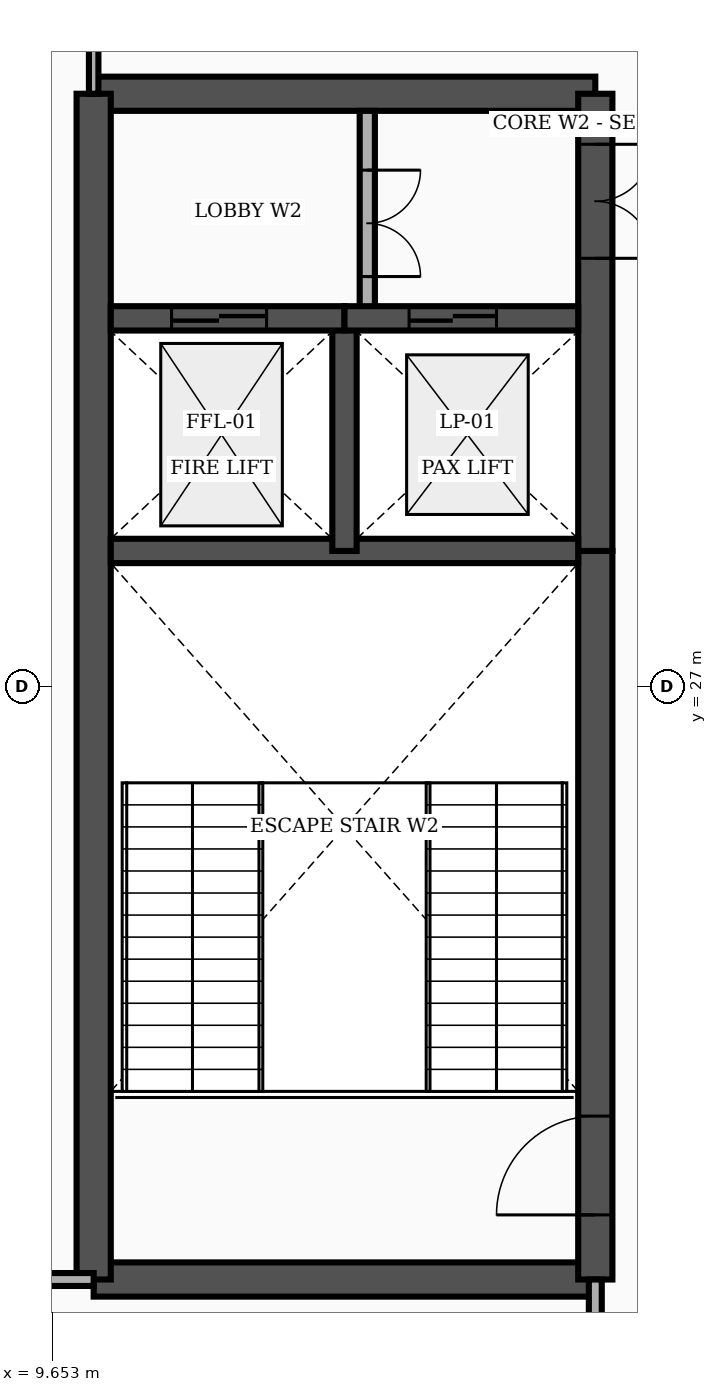
"""IFC4 building model, lengths in metres.
Left out: names, types, materials, properties, quantities, classifications, styles, units other than length and angle.
Written with IfcOpenShell. Run it as: python <this file> out.ifc"""

import sys

from ifc_helpers import new_model, si_unit, direction, frame, frame_2d, origin, place, context, subcontext, project, spatial, rectangle, extrude, element, fill, save


model = new_model("IFC4")
c1 = context("Model", 3, precision=1e-05, world=origin(), true_north=direction((0.0, 1.0)))
c2 = subcontext(c1, "Body", "Model", "MODEL_VIEW")
j1 = project(units=[si_unit("LENGTHUNIT", "METRE"), si_unit("PLANEANGLEUNIT", "RADIAN")], contexts=[c1])
p1 = place(None, origin())
s1 = spatial("IfcSite", under=j1, at=p1, CompositionType="ELEMENT")
p2 = place(p1, origin())
s2 = spatial("IfcBuilding", under=s1, at=p2, CompositionType="ELEMENT")
p3 = place(p2, frame((0.0, 0.0, 16.8)))
s3 = spatial("IfcBuildingStorey", under=s2, at=p3, CompositionType="ELEMENT", Elevation=16.8)
for number, where, z_axis, x_axis in (
    (1, (10.2, 19.2, 0.0), (0.0, 0.0, 1.0), (1.0, 0.0, 0.0)),
    (2, (10.2, 34.8, 0.0), (0.0, 0.0, 1.0), (1.0, 0.0, 0.0)),
):
    element("IfcWall", number, at=place(p3, frame(where, z_axis=z_axis, x_axis=x_axis)), inside=s3, PredefinedType="SHEAR", context=c2, shape_type="SweptSolid", body=[
        extrude(rectangle(XDim=6.6, YDim=0.45, at=frame_2d((3.3, 0.0))), origin(), (0.0, 0.0, 1.0), 4.555),
    ])
p4 = place(p3, frame((10.2, 19.2, 0.0), z_axis=(0.0, 0.0, 1.0), x_axis=(0.0, 1.0, 0.0)))
e3 = element("IfcWall", 3, at=p4, inside=s3, PredefinedType="SHEAR", context=c2, shape_type="SweptSolid", body=[
    extrude(rectangle(XDim=15.6, YDim=0.45, at=frame_2d((7.8, 0.0))), origin(), (0.0, 0.0, 1.0), 4.555),
])
p5 = place(p3, frame((16.8, 19.2, 0.0), z_axis=(0.0, 0.0, 1.0), x_axis=(0.0, 1.0, 0.0)))
e4 = element("IfcWall", 4, at=p5, inside=s3, PredefinedType="SHEAR", context=c2, shape_type="SweptSolid", body=[
    extrude(rectangle(XDim=9.585, YDim=0.45, at=frame_2d((4.792, 0.0))), origin(), (0.0, 0.0, 1.0), 4.555),
])
p6 = place(p5, frame((0.85, 0.0, 0.0)))
e5 = element("IfcOpeningElement", 5, at=p6, cuts=e4, PredefinedType="OPENING", context=c2, shape_type="SweptSolid", body=[
    extrude(rectangle(XDim=1.3, YDim=2.2, at=frame_2d((0.65, 1.1))), frame((0.0, 0.237, 0.0), z_axis=(0.0, -1.0, 0.0), x_axis=(1.0, 0.0, 0.0)), (0.0, 0.0, 1.0), 0.474),
])
p7 = place(p3, frame((16.8, 28.785, 0.0), z_axis=(0.0, 0.0, 1.0), x_axis=(0.0, 1.0, 0.0)))
e6 = element("IfcWall", 6, at=p7, inside=s3, PredefinedType="SHEAR", context=c2, shape_type="SweptSolid", body=[
    extrude(rectangle(XDim=6.015, YDim=0.45, at=frame_2d((3.008, 0.0))), origin(), (0.0, 0.0, 1.0), 4.555),
])
p8 = place(p7, frame((3.85, 0.0, 0.0)))
e7 = element("IfcOpeningElement", 7, at=p8, cuts=e6, PredefinedType="OPENING", context=c2, shape_type="SweptSolid", body=[
    extrude(rectangle(XDim=1.5, YDim=2.2, at=frame_2d((0.75, 1.1))), frame((0.0, 0.237, 0.0), z_axis=(0.0, -1.0, 0.0), x_axis=(1.0, 0.0, 0.0)), (0.0, 0.0, 1.0), 0.474),
])
p9 = place(p3, frame((10.425, 28.785, 0.0), z_axis=(0.0, 0.0, 1.0), x_axis=(1.0, 0.0, 0.0)))
e8 = element("IfcWall", 8, at=p9, inside=s3, PredefinedType="SHEAR", context=c2, shape_type="SweptSolid", body=[
    extrude(rectangle(XDim=6.15, YDim=0.32, at=frame_2d((3.075, 0.0))), origin(), (0.0, 0.0, 1.0), 4.555),
])
p10 = place(p3, frame((13.5, 28.785, 0.0), z_axis=(0.0, 0.0, 1.0), x_axis=(0.0, 1.0, 0.0)))
e9 = element("IfcWall", 9, at=p10, inside=s3, PredefinedType="SHEAR", context=c2, shape_type="SweptSolid", body=[
    extrude(rectangle(XDim=3.06, YDim=0.32, at=frame_2d((1.53, 0.0))), origin(), (0.0, 0.0, 1.0), 4.555),
])
p11 = place(p3, frame((13.8, 31.845, 0.0), z_axis=(0.0, 0.0, 1.0), x_axis=(0.0, 1.0, 0.0)))
e10 = element("IfcWall", 10, at=p11, inside=s3, PredefinedType="PARTITIONING", context=c2, shape_type="SweptSolid", body=[
    extrude(rectangle(XDim=2.73, YDim=0.2, at=frame_2d((1.365, 0.0))), origin(), (0.0, 0.0, 1.0), 4.555),
])
p12 = place(p11, frame((0.55, 0.0, 0.0)))
e11 = element("IfcOpeningElement", 11, at=p12, cuts=e10, PredefinedType="OPENING", context=c2, shape_type="SweptSolid", body=[
    extrude(rectangle(XDim=1.4, YDim=2.25, at=frame_2d((0.7, 1.125))), frame((0.0, 0.112, 0.0), z_axis=(0.0, -1.0, 0.0), x_axis=(1.0, 0.0, 0.0)), (0.0, 0.0, 1.0), 0.224),
])
p13 = place(p3, frame((10.425, 31.845, 0.0), z_axis=(0.0, 0.0, 1.0), x_axis=(1.0, 0.0, 0.0)))
e12 = element("IfcWall", 12, at=p13, inside=s3, PredefinedType="SHEAR", context=c2, shape_type="SweptSolid", body=[
    extrude(rectangle(XDim=3.075, YDim=0.32, at=frame_2d((1.538, 0.0))), origin(), (0.0, 0.0, 1.0), 4.555),
])
p14 = place(p13, frame((0.8, 0.0, 0.0)))
e13 = element("IfcOpeningElement", 13, at=p14, cuts=e12, PredefinedType="OPENING", context=c2, shape_type="SweptSolid", body=[
    extrude(rectangle(XDim=1.25, YDim=2.25, at=frame_2d((0.625, 1.125))), frame((0.0, 0.172, 0.0), z_axis=(0.0, -1.0, 0.0), x_axis=(1.0, 0.0, 0.0)), (0.0, 0.0, 1.0), 0.344),
])
p15 = place(p3, frame((13.5, 31.845, 0.0), z_axis=(0.0, 0.0, 1.0), x_axis=(1.0, 0.0, 0.0)))
e14 = element("IfcWall", 14, at=p15, inside=s3, PredefinedType="SHEAR", context=c2, shape_type="SweptSolid", body=[
    extrude(rectangle(XDim=3.075, YDim=0.32, at=frame_2d((1.538, 0.0))), origin(), (0.0, 0.0, 1.0), 4.555),
])
p16 = place(p15, frame((0.85, 0.0, 0.0)))
e15 = element("IfcOpeningElement", 15, at=p16, cuts=e14, PredefinedType="OPENING", context=c2, shape_type="SweptSolid", body=[
    extrude(rectangle(XDim=1.15, YDim=2.2, at=frame_2d((0.575, 1.1))), frame((0.0, 0.172, 0.0), z_axis=(0.0, -1.0, 0.0), x_axis=(1.0, 0.0, 0.0)), (0.0, 0.0, 1.0), 0.344),
])
p17 = place(p3, frame((10.2, 34.8, 0.0), z_axis=(0.0, 0.0, 1.0), x_axis=(0.0, 1.0, 0.0)))
e16 = element("IfcWall", 16, at=p17, inside=s3, PredefinedType="PARTITIONING", context=c2, shape_type="SweptSolid", body=[
    extrude(rectangle(XDim=2.0, YDim=0.125, at=frame_2d((1.0, 0.0))), origin(), (0.0, 0.0, 1.0), 4.555),
])
p18 = place(p3, frame((0.17, 19.2, 0.0), z_axis=(0.0, 0.0, 1.0), x_axis=(1.0, 0.0, 0.0)))
e17 = element("IfcWall", 17, at=p18, inside=s3, PredefinedType="PARTITIONING", context=c2, shape_type="SweptSolid", body=[
    extrude(rectangle(XDim=10.03, YDim=0.17, at=frame_2d((5.015, 0.0))), origin(), (0.0, 0.0, 1.0), 4.555),
])
p19 = place(p3, frame((16.8, 0.17, 0.0), z_axis=(0.0, 0.0, 1.0), x_axis=(0.0, 1.0, 0.0)))
e18 = element("IfcWall", 18, at=p19, inside=s3, PredefinedType="PARTITIONING", context=c2, shape_type="SweptSolid", body=[
    extrude(rectangle(XDim=19.03, YDim=0.17, at=frame_2d((9.515, 0.0))), origin(), (0.0, 0.0, 1.0), 4.555),
])
p20 = place(p19, frame((3.3, 0.0, 0.0)))
e19 = element("IfcOpeningElement", 19, at=p20, cuts=e18, PredefinedType="OPENING", context=c2, shape_type="SweptSolid", body=[
    extrude(rectangle(XDim=1.15, YDim=2.15, at=frame_2d((0.575, 1.075))), frame((0.0, 0.097, 0.0), z_axis=(0.0, -1.0, 0.0), x_axis=(1.0, 0.0, 0.0)), (0.0, 0.0, 1.0), 0.194),
])
p21 = place(p6, origin())
e20 = element("IfcDoor", 20, at=p21, inside=s3, OperationType="SINGLE_SWING_LEFT", PredefinedType="DOOR", context=c2, shape_type="SweptSolid", body=[
    extrude(rectangle(XDim=1.3, YDim=2.2, at=frame_2d((0.65, 1.1))), frame((0.0, 0.025, 0.0), z_axis=(0.0, -1.0, 0.0), x_axis=(1.0, 0.0, 0.0)), (0.0, 0.0, 1.0), 0.05),
])
fill(e5, e20)
p22 = place(p8, frame((1.5, 0.0, 0.0), z_axis=(0.0, 0.0, 1.0), x_axis=(-1.0, 0.0, 0.0)))
e21 = element("IfcDoor", 21, at=p22, inside=s3, OperationType="DOUBLE_DOOR_SINGLE_SWING", PredefinedType="DOOR", context=c2, shape_type="SweptSolid", body=[
    extrude(rectangle(XDim=1.5, YDim=2.2, at=frame_2d((0.75, 1.1))), frame((0.0, 0.025, 0.0), z_axis=(0.0, -1.0, 0.0), x_axis=(1.0, 0.0, 0.0)), (0.0, 0.0, 1.0), 0.05),
])
fill(e7, e21)
p23 = place(p12, frame((1.4, 0.0, 0.0), z_axis=(0.0, 0.0, 1.0), x_axis=(-1.0, 0.0, 0.0)))
e22 = element("IfcDoor", 22, at=p23, inside=s3, OperationType="DOUBLE_DOOR_SINGLE_SWING", PredefinedType="DOOR", context=c2, shape_type="SweptSolid", body=[
    extrude(rectangle(XDim=1.4, YDim=2.25, at=frame_2d((0.7, 1.125))), frame((0.0, 0.025, 0.0), z_axis=(0.0, -1.0, 0.0), x_axis=(1.0, 0.0, 0.0)), (0.0, 0.0, 1.0), 0.05),
])
fill(e11, e22)
p24 = place(p14, origin())
e23 = element("IfcDoor", 23, at=p24, inside=s3, OperationType="DOUBLE_DOOR_SLIDING", PredefinedType="DOOR", context=c2, shape_type="SweptSolid", body=[
    extrude(rectangle(XDim=1.25, YDim=2.25, at=frame_2d((0.625, 1.125))), frame((0.0, 0.025, 0.0), z_axis=(0.0, -1.0, 0.0), x_axis=(1.0, 0.0, 0.0)), (0.0, 0.0, 1.0), 0.05),
])
fill(e13, e23)
p25 = place(p16, origin())
e24 = element("IfcDoor", 24, at=p25, inside=s3, OperationType="DOUBLE_DOOR_SLIDING", PredefinedType="DOOR", context=c2, shape_type="SweptSolid", body=[
    extrude(rectangle(XDim=1.15, YDim=2.2, at=frame_2d((0.575, 1.1))), frame((0.0, 0.025, 0.0), z_axis=(0.0, -1.0, 0.0), x_axis=(1.0, 0.0, 0.0)), (0.0, 0.0, 1.0), 0.05),
])
fill(e15, e24)
save(model, sys.argv[1])
